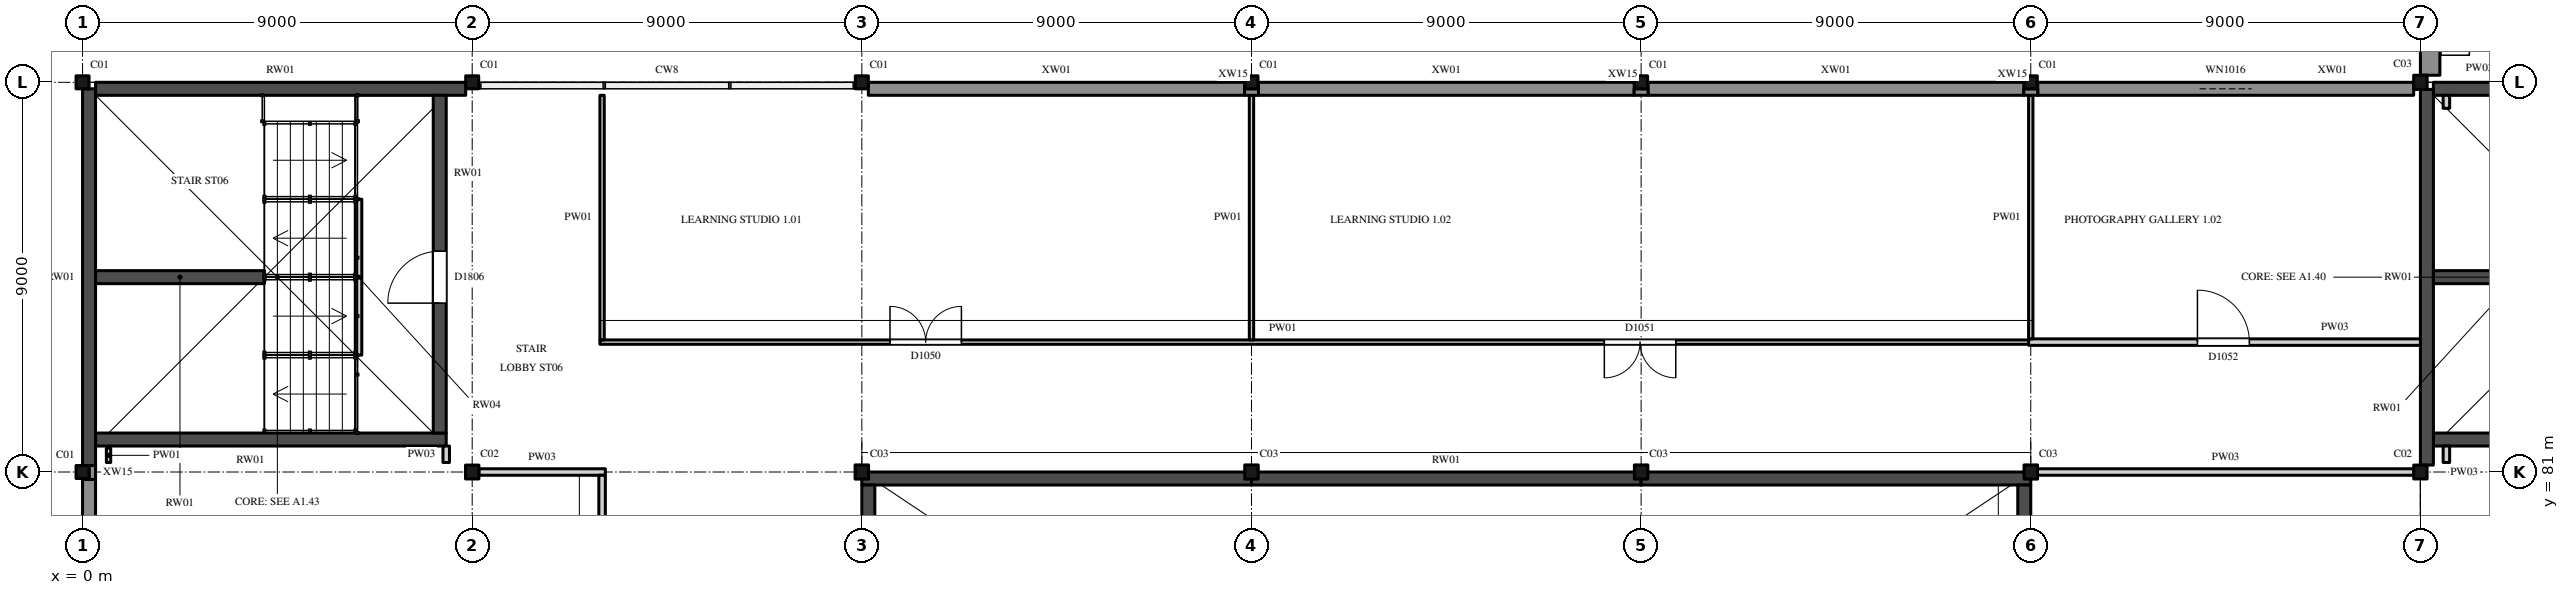
"""IFC4 building model, lengths in metres.
Left out: names, types, materials, properties, quantities, classifications, styles, units other than length and angle.
Written with IfcOpenShell. Run it as: python <this file> out.ifc"""

import sys

from ifc_helpers import new_model, si_unit, direction, frame, frame_2d, origin, origin_2d, place, context, subcontext, project, spatial, rectangle, hollow_rectangle, i_section, extrude, element, fill, save


model = new_model("IFC4")
c1 = context("Model", 3, precision=1e-05, world=origin(), true_north=direction((0.0, 1.0)))
c2 = subcontext(c1, "Body", "Model", "MODEL_VIEW")
j1 = project(units=[si_unit("LENGTHUNIT", "METRE"), si_unit("PLANEANGLEUNIT", "RADIAN")], contexts=[c1])
p1 = place(None, origin())
s1 = spatial("IfcSite", under=j1, at=p1, CompositionType="ELEMENT")
p2 = place(p1, origin())
s2 = spatial("IfcBuilding", under=s1, at=p2, CompositionType="ELEMENT")
p3 = place(p2, frame((0.0, 0.0, 6.0)))
s3 = spatial("IfcBuildingStorey", under=s2, at=p3, CompositionType="ELEMENT", Elevation=6.0)
p4 = place(p3, frame((0.0, 81.0, 0.0), z_axis=(0.0, 0.0, 1.0), x_axis=(1.0, 0.0, 0.0)))
e1 = element("IfcColumn", 1, at=p4, inside=s3, PredefinedType="COLUMN", context=c2, shape_type="SweptSolid", body=[
    extrude(hollow_rectangle(XDim=0.3, YDim=0.3, WallThickness=0.012, InnerFilletRadius=0.019, OuterFilletRadius=0.031, at=origin_2d()), origin(), (0.0, 0.0, 1.0), 5.0),
])
p5 = place(p3, frame((9.0, 81.0, 0.0), z_axis=(0.0, 0.0, 1.0), x_axis=(1.0, 0.0, 0.0)))
e2 = element("IfcColumn", 2, at=p5, inside=s3, PredefinedType="COLUMN", context=c2, shape_type="SweptSolid", body=[
    extrude(i_section(OverallWidth=0.309, OverallDepth=0.321, WebThickness=0.014, FlangeThickness=0.022, FilletRadius=0.017, at=origin_2d()), origin(), (0.0, 0.0, 1.0), 5.0),
])
for number, where, z_axis, x_axis in (
    (3, (18.0, 81.0, 0.0), (0.0, 0.0, 1.0), (1.0, 0.0, 0.0)),
    (4, (27.0, 81.0, 0.0), (0.0, 0.0, 1.0), (1.0, 0.0, 0.0)),
    (5, (36.0, 81.0, 0.0), (0.0, 0.0, 1.0), (1.0, 0.0, 0.0)),
    (6, (45.0, 81.0, 0.0), (0.0, 0.0, 1.0), (1.0, 0.0, 0.0)),
):
    element("IfcColumn", number, at=place(p3, frame(where, z_axis=z_axis, x_axis=x_axis)), inside=s3, PredefinedType="COLUMN", context=c2, shape_type="SweptSolid", body=[
        extrude(i_section(OverallWidth=0.311, OverallDepth=0.327, WebThickness=0.016, FlangeThickness=0.025, FilletRadius=0.017, at=origin_2d()), origin(), (0.0, 0.0, 1.0), 5.0),
    ])
p6 = place(p3, frame((54.0, 81.0, 0.0), z_axis=(0.0, 0.0, 1.0), x_axis=(1.0, 0.0, 0.0)))
e7 = element("IfcColumn", 7, at=p6, inside=s3, PredefinedType="COLUMN", context=c2, shape_type="SweptSolid", body=[
    extrude(i_section(OverallWidth=0.309, OverallDepth=0.321, WebThickness=0.014, FlangeThickness=0.022, FilletRadius=0.017, at=origin_2d()), origin(), (0.0, 0.0, 1.0), 5.0),
])
for number, where, z_axis, x_axis in (
    (8, (0.0, 90.0, 0.0), (0.0, 0.0, 1.0), (1.0, 0.0, 0.0)),
    (9, (9.0, 90.0, 0.0), (0.0, 0.0, 1.0), (1.0, 0.0, 0.0)),
    (10, (18.0, 90.0, 0.0), (0.0, 0.0, 1.0), (1.0, 0.0, 0.0)),
    (11, (27.0, 90.0, 0.0), (0.0, 0.0, 1.0), (1.0, 0.0, 0.0)),
    (12, (36.0, 90.0, 0.0), (0.0, 0.0, 1.0), (1.0, 0.0, 0.0)),
    (13, (45.0, 90.0, 0.0), (0.0, 0.0, 1.0), (1.0, 0.0, 0.0)),
):
    element("IfcColumn", number, at=place(p3, frame(where, z_axis=z_axis, x_axis=x_axis)), inside=s3, PredefinedType="COLUMN", context=c2, shape_type="SweptSolid", body=[
        extrude(hollow_rectangle(XDim=0.3, YDim=0.3, WallThickness=0.012, InnerFilletRadius=0.019, OuterFilletRadius=0.031, at=origin_2d()), origin(), (0.0, 0.0, 1.0), 5.0),
    ])
p7 = place(p3, frame((54.0, 90.0, 0.0), z_axis=(0.0, 0.0, 1.0), x_axis=(1.0, 0.0, 0.0)))
e14 = element("IfcColumn", 14, at=p7, inside=s3, PredefinedType="COLUMN", context=c2, shape_type="SweptSolid", body=[
    extrude(i_section(OverallWidth=0.311, OverallDepth=0.327, WebThickness=0.016, FlangeThickness=0.025, FilletRadius=0.017, at=origin_2d()), origin(), (0.0, 0.0, 1.0), 5.0),
])
p8 = place(p3, frame((54.3, 81.75, 0.0), z_axis=(0.0, 0.0, 1.0), x_axis=(1.0, 0.0, 0.0)))
e15 = element("IfcWall", 15, at=p8, inside=s3, PredefinedType="SHEAR", context=c2, shape_type="SweptSolid", body=[
    extrude(rectangle(XDim=8.1, YDim=0.3, at=frame_2d((4.05, 0.0))), origin(), (0.0, 0.0, 1.0), 5.0),
])
p9 = place(p8, frame((6.3, 0.0, 0.0)))
e16 = element("IfcOpeningElement", 16, at=p9, cuts=e15, PredefinedType="OPENING", context=c2, shape_type="SweptSolid", body=[
    extrude(rectangle(XDim=1.2, YDim=2.1, at=frame_2d((0.6, 1.05))), frame((0.0, 0.16, 0.0), z_axis=(0.0, -1.0, 0.0), x_axis=(1.0, 0.0, 0.0)), (0.0, 0.0, 1.0), 0.32),
])
p10 = place(p3, frame((54.3, 89.85, 0.0), z_axis=(0.0, 0.0, 1.0), x_axis=(1.0, 0.0, 0.0)))
e17 = element("IfcWall", 17, at=p10, inside=s3, PredefinedType="SHEAR", context=c2, shape_type="SweptSolid", body=[
    extrude(rectangle(XDim=8.544, YDim=0.3, at=frame_2d((4.272, 0.0))), origin(), (0.0, 0.0, 1.0), 5.0),
])
p11 = place(p3, frame((54.15, 81.16, 0.0), z_axis=(0.0, 0.0, 1.0), x_axis=(0.0, 1.0, 0.0)))
e18 = element("IfcWall", 18, at=p11, inside=s3, PredefinedType="SHEAR", context=c2, shape_type="SweptSolid", body=[
    extrude(rectangle(XDim=8.676, YDim=0.3, at=frame_2d((4.338, 0.0))), origin(), (0.0, 0.0, 1.0), 5.0),
])
p12 = place(p3, frame((0.3, 81.75, 0.0), z_axis=(0.0, 0.0, 1.0), x_axis=(1.0, 0.0, 0.0)))
e19 = element("IfcWall", 19, at=p12, inside=s3, PredefinedType="SHEAR", context=c2, shape_type="SweptSolid", body=[
    extrude(rectangle(XDim=8.1, YDim=0.3, at=frame_2d((4.05, 0.0))), origin(), (0.0, 0.0, 1.0), 5.0),
])
p13 = place(p3, frame((0.3, 89.85, 0.0), z_axis=(0.0, 0.0, 1.0), x_axis=(1.0, 0.0, 0.0)))
e20 = element("IfcWall", 20, at=p13, inside=s3, PredefinedType="SHEAR", context=c2, shape_type="SweptSolid", body=[
    extrude(rectangle(XDim=8.55, YDim=0.3, at=frame_2d((4.275, 0.0))), origin(), (0.0, 0.0, 1.0), 5.0),
])
p14 = place(p3, frame((0.15, 81.15, 0.0), z_axis=(0.0, 0.0, 1.0), x_axis=(0.0, 1.0, 0.0)))
e21 = element("IfcWall", 21, at=p14, inside=s3, PredefinedType="SHEAR", context=c2, shape_type="SweptSolid", body=[
    extrude(rectangle(XDim=8.7, YDim=0.3, at=frame_2d((4.35, 0.0))), origin(), (0.0, 0.0, 1.0), 5.0),
])
p15 = place(p3, frame((8.25, 81.9, 0.0), z_axis=(0.0, 0.0, 1.0), x_axis=(0.0, 1.0, 0.0)))
e22 = element("IfcWall", 22, at=p15, inside=s3, PredefinedType="SHEAR", context=c2, shape_type="SweptSolid", body=[
    extrude(rectangle(XDim=7.8, YDim=0.3, at=frame_2d((3.9, 0.0))), origin(), (0.0, 0.0, 1.0), 5.0),
])
p16 = place(p15, frame((3.0, 0.0, 0.0)))
e23 = element("IfcOpeningElement", 23, at=p16, cuts=e22, PredefinedType="OPENING", context=c2, shape_type="SweptSolid", body=[
    extrude(rectangle(XDim=1.2, YDim=2.1, at=frame_2d((0.6, 1.05))), frame((0.0, 0.16, 0.0), z_axis=(0.0, -1.0, 0.0), x_axis=(1.0, 0.0, 0.0)), (0.0, 0.0, 1.0), 0.32),
])
for number, where, z_axis, x_axis in (
    (24, (58.2, 85.5, 0.0), (0.0, 0.0, 1.0), (-1.0, 0.0, 0.0)),
    (25, (4.2, 85.5, 0.0), (0.0, 0.0, 1.0), (-1.0, 0.0, 0.0)),
):
    element("IfcWall", number, at=place(p3, frame(where, z_axis=z_axis, x_axis=x_axis)), inside=s3, PredefinedType="SHEAR", context=c2, shape_type="SweptSolid", body=[
        extrude(rectangle(XDim=3.9, YDim=0.3, at=frame_2d((1.95, 0.0))), origin(), (0.0, 0.0, 1.0), 5.0),
    ])
p17 = place(p3, frame((6.375, 83.7, 0.0), z_axis=(0.0, 0.0, 1.0), x_axis=(0.0, 1.0, 0.0)))
e26 = element("IfcWall", 26, at=p17, inside=s3, PredefinedType="STANDARD", context=c2, shape_type="SweptSolid", body=[
    extrude(rectangle(XDim=3.6, YDim=0.15, at=frame_2d((1.8, 0.0))), origin(), (0.0, 0.0, 1.0), 2.3),
])
for number, where, z_axis, x_axis in (
    (27, (18.0, 80.85, 0.0), (0.0, 0.0, 1.0), (1.0, 0.0, 0.0)),
    (28, (27.0, 80.85, 0.0), (0.0, 0.0, 1.0), (1.0, 0.0, 0.0)),
    (29, (36.0, 80.85, 0.0), (0.0, 0.0, 1.0), (1.0, 0.0, 0.0)),
):
    element("IfcWall", number, at=place(p3, frame(where, z_axis=z_axis, x_axis=x_axis)), inside=s3, PredefinedType="SHEAR", context=c2, shape_type="SweptSolid", body=[
        extrude(rectangle(XDim=9.0, YDim=0.3, at=frame_2d((4.5, 0.0))), origin(), (0.0, 0.0, 1.0), 4.825),
    ])
p18 = place(p3, frame((18.15, 72.0, 0.0), z_axis=(0.0, 0.0, 1.0), x_axis=(0.0, 1.0, 0.0)))
e30 = element("IfcWall", 30, at=p18, inside=s3, PredefinedType="SHEAR", context=c2, shape_type="SweptSolid", body=[
    extrude(rectangle(XDim=8.7, YDim=0.3, at=frame_2d((4.35, 0.0))), origin(), (0.0, 0.0, 1.0), 4.825),
])
p19 = place(p3, frame((44.85, 72.0, 0.0), z_axis=(0.0, 0.0, 1.0), x_axis=(0.0, 1.0, 0.0)))
e31 = element("IfcWall", 31, at=p19, inside=s3, PredefinedType="SHEAR", context=c2, shape_type="SweptSolid", body=[
    extrude(rectangle(XDim=8.7, YDim=0.3, at=frame_2d((4.35, 0.0))), origin(), (0.0, 0.0, 1.0), 4.825),
])
p20 = place(p19, frame((4.0, 0.0, 0.0)))
e32 = element("IfcOpeningElement", 32, at=p20, cuts=e31, PredefinedType="OPENING", context=c2, shape_type="SweptSolid", body=[
    extrude(rectangle(XDim=1.0, YDim=2.1, at=frame_2d((0.5, 1.05))), frame((0.0, 0.16, 0.0), z_axis=(0.0, -1.0, 0.0), x_axis=(1.0, 0.0, 0.0)), (0.0, 0.0, 1.0), 0.32),
])
p21 = place(p3, frame((0.15, 72.161, 0.0), z_axis=(0.0, 0.0, 1.0), x_axis=(0.0, 1.0, 0.0)))
e33 = element("IfcWall", 33, at=p21, inside=s3, PredefinedType="SOLIDWALL", context=c2, shape_type="SweptSolid", body=[
    extrude(rectangle(XDim=8.667, YDim=0.3, at=frame_2d((4.333, 0.0))), origin(), (0.0, 0.0, 1.0), 4.365),
])
p22 = place(p21, frame((3.739, 0.0, 1.0)))
e34 = element("IfcOpeningElement", 34, at=p22, cuts=e33, PredefinedType="OPENING", context=c2, shape_type="SweptSolid", body=[
    extrude(rectangle(XDim=1.2, YDim=3.0, at=frame_2d((0.6, 1.5))), frame((0.0, 0.16, 0.0), z_axis=(0.0, -1.0, 0.0), x_axis=(1.0, 0.0, 0.0)), (0.0, 0.0, 1.0), 0.32),
])
p23 = place(p3, frame((18.15, 89.85, 0.0), z_axis=(0.0, 0.0, 1.0), x_axis=(1.0, 0.0, 0.0)))
e35 = element("IfcWall", 35, at=p23, inside=s3, PredefinedType="SOLIDWALL", context=c2, shape_type="SweptSolid", body=[
    extrude(rectangle(XDim=8.689, YDim=0.3, at=frame_2d((4.345, 0.0))), origin(), (0.0, 0.0, 1.0), 4.469),
])
for number, where, z_axis, x_axis in (
    (36, (27.161, 89.85, 0.0), (0.0, 0.0, 1.0), (1.0, 0.0, 0.0)),
    (37, (36.161, 89.85, 0.0), (0.0, 0.0, 1.0), (1.0, 0.0, 0.0)),
):
    element("IfcWall", number, at=place(p3, frame(where, z_axis=z_axis, x_axis=x_axis)), inside=s3, PredefinedType="SOLIDWALL", context=c2, shape_type="SweptSolid", body=[
        extrude(rectangle(XDim=8.678, YDim=0.3, at=frame_2d((4.339, 0.0))), origin(), (0.0, 0.0, 1.0), 4.469),
    ])
p24 = place(p3, frame((45.161, 89.85, 0.0), z_axis=(0.0, 0.0, 1.0), x_axis=(1.0, 0.0, 0.0)))
e38 = element("IfcWall", 38, at=p24, inside=s3, PredefinedType="SOLIDWALL", context=c2, shape_type="SweptSolid", body=[
    extrude(rectangle(XDim=8.684, YDim=0.3, at=frame_2d((4.342, 0.0))), origin(), (0.0, 0.0, 1.0), 4.469),
])
p25 = place(p24, frame((3.739, 0.0, 1.0)))
e39 = element("IfcOpeningElement", 39, at=p25, cuts=e38, PredefinedType="OPENING", context=c2, shape_type="SweptSolid", body=[
    extrude(rectangle(XDim=1.2, YDim=3.0, at=frame_2d((0.6, 1.5))), frame((0.0, 0.16, 0.0), z_axis=(0.0, -1.0, 0.0), x_axis=(1.0, 0.0, 0.0)), (0.0, 0.0, 1.0), 0.32),
])
p26 = place(p3, frame((54.225, 90.164, 0.0), z_axis=(0.0, 0.0, 1.0), x_axis=(0.0, 1.0, 0.0)))
e40 = element("IfcWall", 40, at=p26, inside=s3, PredefinedType="SOLIDWALL", context=c2, shape_type="SweptSolid", body=[
    extrude(rectangle(XDim=8.676, YDim=0.45, at=frame_2d((4.338, 0.0))), origin(), (0.0, 0.0, 1.0), 4.365),
])
p27 = place(p26, frame((0.586, 0.0, 1.6)))
e41 = element("IfcOpeningElement", 41, at=p27, cuts=e40, PredefinedType="OPENING", context=c2, shape_type="SweptSolid", body=[
    extrude(rectangle(XDim=7.5, YDim=1.2, at=frame_2d((3.75, 0.6))), frame((0.0, 0.235, 0.0), z_axis=(0.0, -1.0, 0.0), x_axis=(1.0, 0.0, 0.0)), (0.0, 0.0, 1.0), 0.47),
])
for number, where, z_axis, x_axis in (
    (42, (26.839, 89.775, 0.0), (0.0, 0.0, 1.0), (1.0, 0.0, 0.0)),
    (43, (35.839, 89.775, 0.0), (0.0, 0.0, 1.0), (1.0, 0.0, 0.0)),
    (44, (44.839, 89.775, 0.0), (0.0, 0.0, 1.0), (1.0, 0.0, 0.0)),
):
    element("IfcWall", number, at=place(p3, frame(where, z_axis=z_axis, x_axis=x_axis)), inside=s3, PredefinedType="SOLIDWALL", context=c2, shape_type="SweptSolid", body=[
        extrude(rectangle(XDim=0.322, YDim=0.15, at=frame_2d((0.161, 0.0))), origin(), (0.0, 0.0, 1.0), 4.469),
    ])
p28 = place(p3, frame((0.225, 80.828, 0.0), z_axis=(0.0, 0.0, 1.0), x_axis=(0.0, 1.0, 0.0)))
e45 = element("IfcWall", 45, at=p28, inside=s3, PredefinedType="SOLIDWALL", context=c2, shape_type="SweptSolid", body=[
    extrude(rectangle(XDim=0.322, YDim=0.15, at=frame_2d((0.161, 0.0))), origin(), (0.0, 0.0, 1.0), 5.0),
])
p29 = place(p3, frame((9.155, 81.0, 0.0), z_axis=(0.0, 0.0, 1.0), x_axis=(1.0, 0.0, 0.0)))
e46 = element("IfcWall", 46, at=p29, inside=s3, PredefinedType="PARTITIONING", context=c2, shape_type="SweptSolid", body=[
    extrude(rectangle(XDim=2.92, YDim=0.15, at=frame_2d((1.46, 0.0))), origin(), (0.0, 0.0, 1.0), 4.469),
])
p30 = place(p3, frame((45.156, 81.0, 0.0), z_axis=(0.0, 0.0, 1.0), x_axis=(1.0, 0.0, 0.0)))
e47 = element("IfcWall", 47, at=p30, inside=s3, PredefinedType="PARTITIONING", context=c2, shape_type="SweptSolid", body=[
    extrude(rectangle(XDim=8.69, YDim=0.15, at=frame_2d((4.345, 0.0))), origin(), (0.0, 0.0, 1.0), 4.469),
])
p31 = place(p3, frame((11.95, 84.0, 0.0), z_axis=(0.0, 0.0, 1.0), x_axis=(1.0, 0.0, 0.0)))
e48 = element("IfcWall", 48, at=p31, inside=s3, PredefinedType="PARTITIONING", context=c2, shape_type="SweptSolid", body=[
    extrude(rectangle(XDim=33.1, YDim=0.1, at=frame_2d((16.55, 0.0))), origin(), (0.0, 0.0, 1.0), 4.469),
])
p32 = place(p31, frame((6.7, 0.0, 0.0)))
e49 = element("IfcOpeningElement", 49, at=p32, cuts=e48, PredefinedType="OPENING", context=c2, shape_type="SweptSolid", body=[
    extrude(rectangle(XDim=1.65, YDim=2.1, at=frame_2d((0.825, 1.05))), frame((0.0, 0.06, 0.0), z_axis=(0.0, -1.0, 0.0), x_axis=(1.0, 0.0, 0.0)), (0.0, 0.0, 1.0), 0.12),
])
p33 = place(p31, frame((23.2, 0.0, 0.0)))
e50 = element("IfcOpeningElement", 50, at=p33, cuts=e48, PredefinedType="OPENING", context=c2, shape_type="SweptSolid", body=[
    extrude(rectangle(XDim=1.65, YDim=2.1, at=frame_2d((0.825, 1.05))), frame((0.0, 0.06, 0.0), z_axis=(0.0, -1.0, 0.0), x_axis=(1.0, 0.0, 0.0)), (0.0, 0.0, 1.0), 0.12),
])
p34 = place(p3, frame((44.95, 84.0, 0.0), z_axis=(0.0, 0.0, 1.0), x_axis=(1.0, 0.0, 0.0)))
e51 = element("IfcWall", 51, at=p34, inside=s3, PredefinedType="PARTITIONING", context=c2, shape_type="SweptSolid", body=[
    extrude(rectangle(XDim=9.05, YDim=0.15, at=frame_2d((4.525, 0.0))), origin(), (0.0, 0.0, 1.0), 4.469),
])
p35 = place(p34, frame((3.9, 0.0, 0.0)))
e52 = element("IfcOpeningElement", 52, at=p35, cuts=e51, PredefinedType="OPENING", context=c2, shape_type="SweptSolid", body=[
    extrude(rectangle(XDim=1.2, YDim=2.4, at=frame_2d((0.6, 1.2))), frame((0.0, 0.085, 0.0), z_axis=(0.0, -1.0, 0.0), x_axis=(1.0, 0.0, 0.0)), (0.0, 0.0, 1.0), 0.17),
])
p36 = place(p3, frame((0.6, 81.22, 0.0), z_axis=(0.0, 0.0, 1.0), x_axis=(0.0, 1.0, 0.0)))
e53 = element("IfcWall", 53, at=p36, inside=s3, PredefinedType="PARTITIONING", context=c2, shape_type="SweptSolid", body=[
    extrude(rectangle(XDim=0.33, YDim=0.1, at=frame_2d((0.165, 0.0))), origin(), (0.0, 0.0, 1.0), 4.825),
])
p37 = place(p3, frame((8.4, 81.22, 0.0), z_axis=(0.0, 0.0, 1.0), x_axis=(0.0, 1.0, 0.0)))
e54 = element("IfcWall", 54, at=p37, inside=s3, PredefinedType="PARTITIONING", context=c2, shape_type="SweptSolid", body=[
    extrude(rectangle(XDim=0.38, YDim=0.15, at=frame_2d((0.19, 0.0))), origin(), (0.0, 0.0, 1.0), 4.825),
])
p38 = place(p3, frame((12.0, 63.062, 0.0), z_axis=(0.0, 0.0, 1.0), x_axis=(0.0, 1.0, 0.0)))
e55 = element("IfcWall", 55, at=p38, inside=s3, PredefinedType="PARTITIONING", context=c2, shape_type="SweptSolid", body=[
    extrude(rectangle(XDim=17.863, YDim=0.15, at=frame_2d((8.931, 0.0))), origin(), (0.0, 0.0, 1.0), 4.825),
])
p39 = place(p38, frame((8.05, 0.0, 0.0)))
e56 = element("IfcOpeningElement", 56, at=p39, cuts=e55, PredefinedType="OPENING", context=c2, shape_type="SweptSolid", body=[
    extrude(rectangle(XDim=1.8, YDim=2.4, at=frame_2d((0.9, 1.2))), frame((0.0, 0.085, 0.0), z_axis=(0.0, -1.0, 0.0), x_axis=(1.0, 0.0, 0.0)), (0.0, 0.0, 1.0), 0.17),
])
p40 = place(p3, frame((12.0, 84.05, 0.0), z_axis=(0.0, 0.0, 1.0), x_axis=(0.0, 1.0, 0.0)))
e57 = element("IfcWall", 57, at=p40, inside=s3, PredefinedType="PARTITIONING", context=c2, shape_type="SweptSolid", body=[
    extrude(rectangle(XDim=5.65, YDim=0.1, at=frame_2d((2.825, 0.0))), origin(), (0.0, 0.0, 1.0), 4.825),
])
p41 = place(p3, frame((27.0, 84.05, 0.0), z_axis=(0.0, 0.0, 1.0), x_axis=(0.0, 1.0, 0.0)))
e58 = element("IfcWall", 58, at=p41, inside=s3, PredefinedType="PARTITIONING", context=c2, shape_type="SweptSolid", body=[
    extrude(rectangle(XDim=5.65, YDim=0.1, at=frame_2d((2.825, 0.0))), origin(), (0.0, 0.0, 1.0), 4.365),
])
p42 = place(p3, frame((45.0, 84.075, 0.0), z_axis=(0.0, 0.0, 1.0), x_axis=(0.0, 1.0, 0.0)))
e59 = element("IfcWall", 59, at=p42, inside=s3, PredefinedType="PARTITIONING", context=c2, shape_type="SweptSolid", body=[
    extrude(rectangle(XDim=5.625, YDim=0.1, at=frame_2d((2.812, 0.0))), origin(), (0.0, 0.0, 1.0), 4.365),
])
p43 = place(p3, frame((54.6, 81.22, 0.0), z_axis=(0.0, 0.0, 1.0), x_axis=(0.0, 1.0, 0.0)))
e60 = element("IfcWall", 60, at=p43, inside=s3, PredefinedType="PARTITIONING", context=c2, shape_type="SweptSolid", body=[
    extrude(rectangle(XDim=0.38, YDim=0.15, at=frame_2d((0.19, 0.0))), origin(), (0.0, 0.0, 1.0), 4.825),
])
p44 = place(p3, frame((54.6, 89.4, 0.0), z_axis=(0.0, 0.0, 1.0), x_axis=(0.0, 1.0, 0.0)))
e61 = element("IfcWall", 61, at=p44, inside=s3, PredefinedType="PARTITIONING", context=c2, shape_type="SweptSolid", body=[
    extrude(rectangle(XDim=0.3, YDim=0.15, at=frame_2d((0.15, 0.0))), origin(), (0.0, 0.0, 1.0), 4.825),
])
p45 = place(p16, origin())
e62 = element("IfcDoor", 62, at=p45, inside=s3, OperationType="SINGLE_SWING_RIGHT", PredefinedType="DOOR", context=c2, shape_type="SweptSolid", body=[
    extrude(rectangle(XDim=1.2, YDim=2.1, at=frame_2d((0.6, 1.05))), frame((0.0, 0.025, 0.0), z_axis=(0.0, -1.0, 0.0), x_axis=(1.0, 0.0, 0.0)), (0.0, 0.0, 1.0), 0.05),
])
fill(e23, e62)
p46 = place(p25, origin())
e63 = element("IfcWindow", 63, at=p46, inside=s3, PartitioningType="SINGLE_PANEL", PredefinedType="WINDOW", context=c2, shape_type="SweptSolid", body=[
    extrude(rectangle(XDim=1.2, YDim=3.0, at=frame_2d((0.6, 1.5))), frame((0.0, 0.03, 0.0), z_axis=(0.0, -1.0, 0.0), x_axis=(1.0, 0.0, 0.0)), (0.0, 0.0, 1.0), 0.06),
])
fill(e39, e63)
p47 = place(p32, origin())
e64 = element("IfcDoor", 64, at=p47, inside=s3, OperationType="DOUBLE_DOOR_SINGLE_SWING", PredefinedType="DOOR", context=c2, shape_type="SweptSolid", body=[
    extrude(rectangle(XDim=1.65, YDim=2.1, at=frame_2d((0.825, 1.05))), frame((0.0, 0.025, 0.0), z_axis=(0.0, -1.0, 0.0), x_axis=(1.0, 0.0, 0.0)), (0.0, 0.0, 1.0), 0.05),
])
fill(e49, e64)
p48 = place(p33, origin())
e65 = element("IfcDoor", 65, at=p48, inside=s3, OperationType="DOUBLE_DOOR_SINGLE_SWING", PredefinedType="DOOR", context=c2, shape_type="SweptSolid", body=[
    extrude(rectangle(XDim=1.65, YDim=2.1, at=frame_2d((0.825, 1.05))), frame((0.0, 0.025, 0.0), z_axis=(0.0, -1.0, 0.0), x_axis=(1.0, 0.0, 0.0)), (0.0, 0.0, 1.0), 0.05),
])
fill(e50, e65)
p49 = place(p35, origin())
e66 = element("IfcDoor", 66, at=p49, inside=s3, OperationType="SINGLE_SWING_RIGHT", PredefinedType="DOOR", context=c2, shape_type="SweptSolid", body=[
    extrude(rectangle(XDim=1.2, YDim=2.4, at=frame_2d((0.6, 1.2))), frame((0.0, 0.025, 0.0), z_axis=(0.0, -1.0, 0.0), x_axis=(1.0, 0.0, 0.0)), (0.0, 0.0, 1.0), 0.05),
])
fill(e52, e66)
save(model, sys.argv[1])
